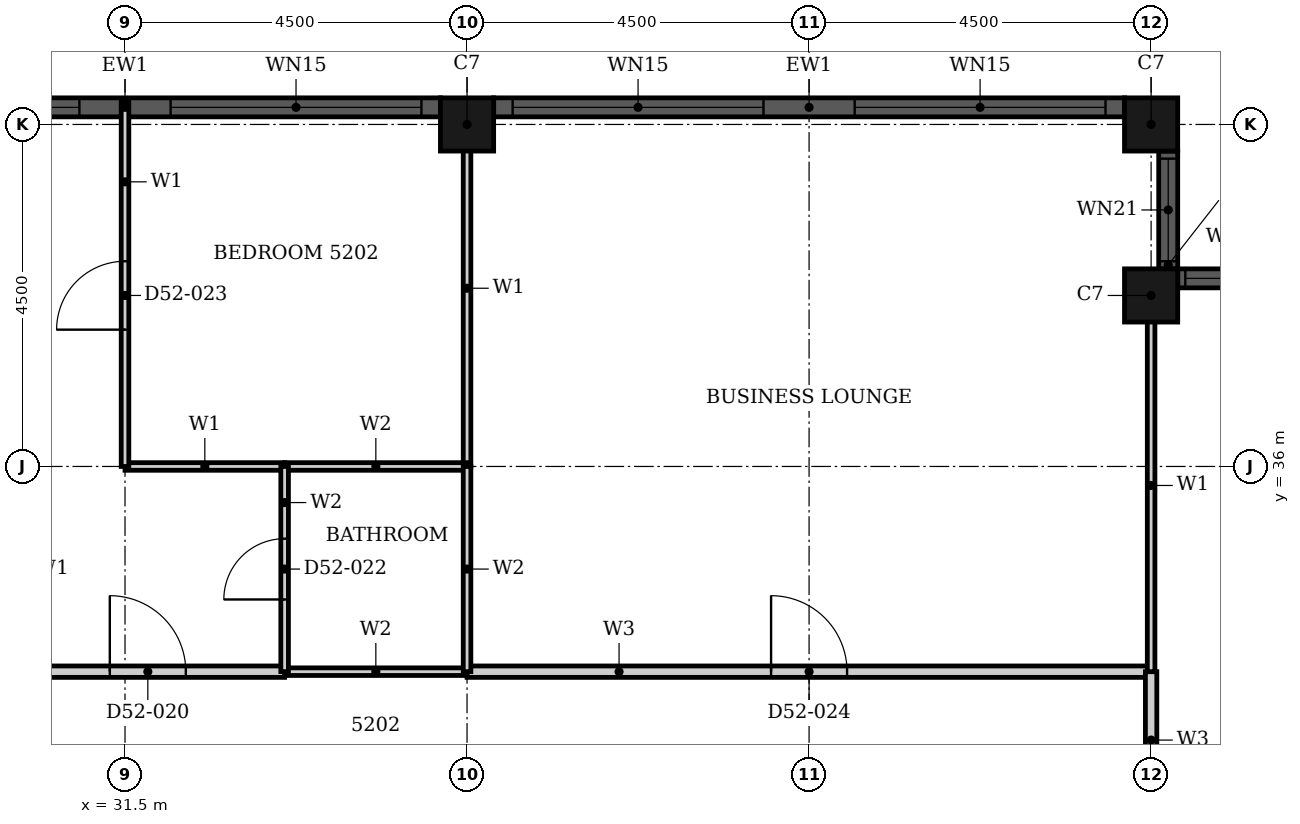
"""IFC4 building model, lengths in metres.
Left out: names, types, materials, properties, quantities, classifications, styles, units other than length and angle.
Written with IfcOpenShell. Run it as: python <this file> out.ifc"""

import sys

from ifc_helpers import new_model, si_unit, direction, frame, frame_2d, origin, origin_2d, place, context, subcontext, project, spatial, rectangle, hollow_rectangle, extrude, element, fill, save


model = new_model("IFC4")
c1 = context("Model", 3, precision=1e-05, world=origin(), true_north=direction((0.0, 1.0)))
c2 = subcontext(c1, "Body", "Model", "MODEL_VIEW")
j1 = project(units=[si_unit("LENGTHUNIT", "METRE"), si_unit("PLANEANGLEUNIT", "RADIAN")], contexts=[c1])
p1 = place(None, origin())
s1 = spatial("IfcSite", under=j1, at=p1, CompositionType="ELEMENT")
p2 = place(p1, origin())
s2 = spatial("IfcBuilding", under=s1, at=p2, CompositionType="ELEMENT")
p3 = place(p2, frame((0.0, 0.0, 207.2)))
s3 = spatial("IfcBuildingStorey", under=s2, at=p3, CompositionType="ELEMENT", Elevation=207.2)
for number, where, z_axis, x_axis in (
    (1, (45.0, 38.25, 0.0), (0.0, 0.0, 1.0), (1.0, 0.0, 0.0)),
    (2, (45.0, 40.5, 0.0), (0.0, 0.0, 1.0), (1.0, 0.0, 0.0)),
    (3, (36.0, 40.5, 0.0), (0.0, 0.0, 1.0), (1.0, 0.0, 0.0)),
):
    element("IfcColumn", number, at=place(p3, frame(where, z_axis=z_axis, x_axis=x_axis)), inside=s3, PredefinedType="COLUMN", context=c2, shape_type="SweptSolid", body=[
        extrude(hollow_rectangle(XDim=0.7, YDim=0.7, WallThickness=0.022, at=origin_2d()), origin(), (0.0, 0.0, 1.0), 3.7),
    ])
p4 = place(p3, frame((46.9, 38.475, 0.0), z_axis=(0.0, 0.0, 1.0), x_axis=(-1.0, 0.0, 0.0)))
e4 = element("IfcWall", 4, at=p4, inside=s3, PredefinedType="SOLIDWALL", context=c2, shape_type="SweptSolid", body=[
    extrude(rectangle(XDim=1.55, YDim=0.25, at=frame_2d((0.775, 0.0))), origin(), (0.0, 0.0, 1.0), 3.7),
])
p5 = place(p4, frame((0.1, 0.0, 0.9)))
e5 = element("IfcOpeningElement", 5, at=p5, cuts=e4, PredefinedType="OPENING", context=c2, shape_type="SweptSolid", body=[
    extrude(rectangle(XDim=1.35, YDim=1.85, at=frame_2d((0.675, 0.925))), frame((0.0, 0.135, 0.0), z_axis=(0.0, -1.0, 0.0), x_axis=(1.0, 0.0, 0.0)), (0.0, 0.0, 1.0), 0.27),
])
p6 = place(p3, frame((45.225, 38.6, 0.0), z_axis=(0.0, 0.0, 1.0), x_axis=(0.0, 1.0, 0.0)))
e6 = element("IfcWall", 6, at=p6, inside=s3, PredefinedType="SOLIDWALL", context=c2, shape_type="SweptSolid", body=[
    extrude(rectangle(XDim=1.55, YDim=0.25, at=frame_2d((0.775, 0.0))), origin(), (0.0, 0.0, 1.0), 3.7),
])
p7 = place(p6, frame((0.1, 0.0, 0.9)))
e7 = element("IfcOpeningElement", 7, at=p7, cuts=e6, PredefinedType="OPENING", context=c2, shape_type="SweptSolid", body=[
    extrude(rectangle(XDim=1.35, YDim=1.85, at=frame_2d((0.675, 0.925))), frame((0.0, 0.135, 0.0), z_axis=(0.0, -1.0, 0.0), x_axis=(1.0, 0.0, 0.0)), (0.0, 0.0, 1.0), 0.27),
])
p8 = place(p3, frame((44.65, 40.725, 0.0), z_axis=(0.0, 0.0, 1.0), x_axis=(-1.0, 0.0, 0.0)))
e8 = element("IfcWall", 8, at=p8, inside=s3, PredefinedType="SOLIDWALL", context=c2, shape_type="SweptSolid", body=[
    extrude(rectangle(XDim=8.3, YDim=0.25, at=frame_2d((4.15, 0.0))), origin(), (0.0, 0.0, 1.0), 3.7),
])
p9 = place(p8, frame((0.25, 0.0, 0.45)))
e9 = element("IfcOpeningElement", 9, at=p9, cuts=e8, PredefinedType="OPENING", context=c2, shape_type="SweptSolid", body=[
    extrude(rectangle(XDim=3.3, YDim=2.3, at=frame_2d((1.65, 1.15))), frame((0.0, 0.135, 0.0), z_axis=(0.0, -1.0, 0.0), x_axis=(1.0, 0.0, 0.0)), (0.0, 0.0, 1.0), 0.27),
])
p10 = place(p8, frame((4.75, 0.0, 0.45)))
e10 = element("IfcOpeningElement", 10, at=p10, cuts=e8, PredefinedType="OPENING", context=c2, shape_type="SweptSolid", body=[
    extrude(rectangle(XDim=3.3, YDim=2.3, at=frame_2d((1.65, 1.15))), frame((0.0, 0.135, 0.0), z_axis=(0.0, -1.0, 0.0), x_axis=(1.0, 0.0, 0.0)), (0.0, 0.0, 1.0), 0.27),
])
p11 = place(p3, frame((35.65, 40.725, 0.0), z_axis=(0.0, 0.0, 1.0), x_axis=(-1.0, 0.0, 0.0)))
e11 = element("IfcWall", 11, at=p11, inside=s3, PredefinedType="SOLIDWALL", context=c2, shape_type="SweptSolid", body=[
    extrude(rectangle(XDim=8.3, YDim=0.25, at=frame_2d((4.15, 0.0))), origin(), (0.0, 0.0, 1.0), 3.7),
])
p12 = place(p11, frame((0.25, 0.0, 0.45)))
e12 = element("IfcOpeningElement", 12, at=p12, cuts=e11, PredefinedType="OPENING", context=c2, shape_type="SweptSolid", body=[
    extrude(rectangle(XDim=3.3, YDim=2.3, at=frame_2d((1.65, 1.15))), frame((0.0, 0.135, 0.0), z_axis=(0.0, -1.0, 0.0), x_axis=(1.0, 0.0, 0.0)), (0.0, 0.0, 1.0), 0.27),
])
p13 = place(p11, frame((4.75, 0.0, 0.45)))
e13 = element("IfcOpeningElement", 13, at=p13, cuts=e11, PredefinedType="OPENING", context=c2, shape_type="SweptSolid", body=[
    extrude(rectangle(XDim=3.3, YDim=2.3, at=frame_2d((1.65, 1.15))), frame((0.0, 0.135, 0.0), z_axis=(0.0, -1.0, 0.0), x_axis=(1.0, 0.0, 0.0)), (0.0, 0.0, 1.0), 0.27),
])
p14 = place(p3, frame((27.0, 33.3, 0.0), z_axis=(0.0, 0.0, 1.0), x_axis=(1.0, 0.0, 0.0)))
e14 = element("IfcWall", 14, at=p14, inside=s3, PredefinedType="PARTITIONING", context=c2, shape_type="SweptSolid", body=[
    extrude(rectangle(XDim=6.6, YDim=0.15, at=frame_2d((3.3, 0.0))), origin(), (0.0, 0.0, 1.0), 3.4),
])
p15 = place(p14, frame((4.3, 0.0, 0.0)))
e15 = element("IfcOpeningElement", 15, at=p15, cuts=e14, PredefinedType="OPENING", context=c2, shape_type="SweptSolid", body=[
    extrude(rectangle(XDim=1.0, YDim=2.2, at=frame_2d((0.5, 1.1))), frame((0.0, 0.085, 0.0), z_axis=(0.0, -1.0, 0.0), x_axis=(1.0, 0.0, 0.0)), (0.0, 0.0, 1.0), 0.17),
])
p16 = place(p3, frame((36.0, 33.3, 0.0), z_axis=(0.0, 0.0, 1.0), x_axis=(1.0, 0.0, 0.0)))
e16 = element("IfcWall", 16, at=p16, inside=s3, PredefinedType="PARTITIONING", context=c2, shape_type="SweptSolid", body=[
    extrude(rectangle(XDim=9.0, YDim=0.15, at=frame_2d((4.5, 0.0))), origin(), (0.0, 0.0, 1.0), 3.4),
])
p17 = place(p16, frame((4.0, 0.0, 0.0)))
e17 = element("IfcOpeningElement", 17, at=p17, cuts=e16, PredefinedType="OPENING", context=c2, shape_type="SweptSolid", body=[
    extrude(rectangle(XDim=1.0, YDim=2.1, at=frame_2d((0.5, 1.05))), frame((0.0, 0.085, 0.0), z_axis=(0.0, -1.0, 0.0), x_axis=(1.0, 0.0, 0.0)), (0.0, 0.0, 1.0), 0.17),
])
p18 = place(p3, frame((45.0, 31.5, 0.0), z_axis=(0.0, 0.0, 1.0), x_axis=(0.0, 1.0, 0.0)))
e18 = element("IfcWall", 18, at=p18, inside=s3, PredefinedType="PARTITIONING", context=c2, shape_type="SweptSolid", body=[
    extrude(rectangle(XDim=1.8, YDim=0.15, at=frame_2d((0.9, 0.0))), origin(), (0.0, 0.0, 1.0), 3.4),
])
p19 = place(p3, frame((31.5, 36.0, 0.0), z_axis=(0.0, 0.0, 1.0), x_axis=(1.0, 0.0, 0.0)))
e19 = element("IfcWall", 19, at=p19, inside=s3, PredefinedType="PARTITIONING", context=c2, shape_type="SweptSolid", body=[
    extrude(rectangle(XDim=2.1, YDim=0.1, at=frame_2d((1.05, 0.0))), origin(), (0.0, 0.0, 1.0), 3.4),
])
p20 = place(p3, frame((31.5, 36.0, 0.0), z_axis=(0.0, 0.0, 1.0), x_axis=(0.0, 1.0, 0.0)))
e20 = element("IfcWall", 20, at=p20, inside=s3, PredefinedType="PARTITIONING", context=c2, shape_type="SweptSolid", body=[
    extrude(rectangle(XDim=4.79, YDim=0.1, at=frame_2d((2.395, 0.0))), origin(), (0.0, 0.0, 1.0), 3.4),
])
p21 = place(p20, frame((1.8, 0.0, 0.0)))
e21 = element("IfcOpeningElement", 21, at=p21, cuts=e20, PredefinedType="OPENING", context=c2, shape_type="SweptSolid", body=[
    extrude(rectangle(XDim=0.9, YDim=2.1, at=frame_2d((0.45, 1.05))), frame((0.0, 0.06, 0.0), z_axis=(0.0, -1.0, 0.0), x_axis=(1.0, 0.0, 0.0)), (0.0, 0.0, 1.0), 0.12),
])
p22 = place(p3, frame((36.0, 36.0, 0.0), z_axis=(0.0, 0.0, 1.0), x_axis=(0.0, 1.0, 0.0)))
e22 = element("IfcWall", 22, at=p22, inside=s3, PredefinedType="PARTITIONING", context=c2, shape_type="SweptSolid", body=[
    extrude(rectangle(XDim=4.69, YDim=0.1, at=frame_2d((2.345, 0.0))), origin(), (0.0, 0.0, 1.0), 3.4),
])
p23 = place(p3, frame((45.0, 33.3, 0.0), z_axis=(0.0, 0.0, 1.0), x_axis=(0.0, 1.0, 0.0)))
e23 = element("IfcWall", 23, at=p23, inside=s3, PredefinedType="PARTITIONING", context=c2, shape_type="SweptSolid", body=[
    extrude(rectangle(XDim=4.9, YDim=0.1, at=frame_2d((2.45, 0.0))), origin(), (0.0, 0.0, 1.0), 3.4),
])
for number, where, z_axis, x_axis in (
    (24, (33.6, 33.3, 0.0), (0.0, 0.0, 1.0), (1.0, 0.0, 0.0)),
    (25, (33.6, 36.0, 0.0), (0.0, 0.0, 1.0), (1.0, 0.0, 0.0)),
):
    element("IfcWall", number, at=place(p3, frame(where, z_axis=z_axis, x_axis=x_axis)), inside=s3, PredefinedType="PARTITIONING", context=c2, shape_type="SweptSolid", body=[
        extrude(rectangle(XDim=2.4, YDim=0.1, at=frame_2d((1.2, 0.0))), origin(), (0.0, 0.0, 1.0), 3.4),
    ])
p24 = place(p3, frame((33.6, 33.3, 0.0), z_axis=(0.0, 0.0, 1.0), x_axis=(0.0, 1.0, 0.0)))
e26 = element("IfcWall", 26, at=p24, inside=s3, PredefinedType="PARTITIONING", context=c2, shape_type="SweptSolid", body=[
    extrude(rectangle(XDim=2.7, YDim=0.1, at=frame_2d((1.35, 0.0))), origin(), (0.0, 0.0, 1.0), 3.4),
])
p25 = place(p24, frame((0.95, 0.0, 0.0)))
e27 = element("IfcOpeningElement", 27, at=p25, cuts=e26, PredefinedType="OPENING", context=c2, shape_type="SweptSolid", body=[
    extrude(rectangle(XDim=0.8, YDim=2.1, at=frame_2d((0.4, 1.05))), frame((0.0, 0.06, 0.0), z_axis=(0.0, -1.0, 0.0), x_axis=(1.0, 0.0, 0.0)), (0.0, 0.0, 1.0), 0.12),
])
p26 = place(p3, frame((36.0, 33.3, 0.0), z_axis=(0.0, 0.0, 1.0), x_axis=(0.0, 1.0, 0.0)))
e28 = element("IfcWall", 28, at=p26, inside=s3, PredefinedType="PARTITIONING", context=c2, shape_type="SweptSolid", body=[
    extrude(rectangle(XDim=2.7, YDim=0.1, at=frame_2d((1.35, 0.0))), origin(), (0.0, 0.0, 1.0), 3.4),
])
p27 = place(p5, origin())
e29 = element("IfcWindow", 29, at=p27, inside=s3, PartitioningType="SINGLE_PANEL", PredefinedType="WINDOW", context=c2, shape_type="SweptSolid", body=[
    extrude(rectangle(XDim=1.35, YDim=1.85, at=frame_2d((0.675, 0.925))), frame((0.0, 0.03, 0.0), z_axis=(0.0, -1.0, 0.0), x_axis=(1.0, 0.0, 0.0)), (0.0, 0.0, 1.0), 0.06),
])
fill(e5, e29)
p28 = place(p7, origin())
e30 = element("IfcWindow", 30, at=p28, inside=s3, PartitioningType="SINGLE_PANEL", PredefinedType="WINDOW", context=c2, shape_type="SweptSolid", body=[
    extrude(rectangle(XDim=1.35, YDim=1.85, at=frame_2d((0.675, 0.925))), frame((0.0, 0.03, 0.0), z_axis=(0.0, -1.0, 0.0), x_axis=(1.0, 0.0, 0.0)), (0.0, 0.0, 1.0), 0.06),
])
fill(e7, e30)
p29 = place(p9, origin())
e31 = element("IfcWindow", 31, at=p29, inside=s3, PartitioningType="SINGLE_PANEL", PredefinedType="WINDOW", context=c2, shape_type="SweptSolid", body=[
    extrude(rectangle(XDim=3.3, YDim=2.3, at=frame_2d((1.65, 1.15))), frame((0.0, 0.03, 0.0), z_axis=(0.0, -1.0, 0.0), x_axis=(1.0, 0.0, 0.0)), (0.0, 0.0, 1.0), 0.06),
])
fill(e9, e31)
p30 = place(p10, origin())
e32 = element("IfcWindow", 32, at=p30, inside=s3, PartitioningType="SINGLE_PANEL", PredefinedType="WINDOW", context=c2, shape_type="SweptSolid", body=[
    extrude(rectangle(XDim=3.3, YDim=2.3, at=frame_2d((1.65, 1.15))), frame((0.0, 0.03, 0.0), z_axis=(0.0, -1.0, 0.0), x_axis=(1.0, 0.0, 0.0)), (0.0, 0.0, 1.0), 0.06),
])
fill(e10, e32)
p31 = place(p12, origin())
e33 = element("IfcWindow", 33, at=p31, inside=s3, PartitioningType="SINGLE_PANEL", PredefinedType="WINDOW", context=c2, shape_type="SweptSolid", body=[
    extrude(rectangle(XDim=3.3, YDim=2.3, at=frame_2d((1.65, 1.15))), frame((0.0, 0.03, 0.0), z_axis=(0.0, -1.0, 0.0), x_axis=(1.0, 0.0, 0.0)), (0.0, 0.0, 1.0), 0.06),
])
fill(e12, e33)
p32 = place(p13, origin())
e34 = element("IfcWindow", 34, at=p32, inside=s3, PartitioningType="SINGLE_PANEL", PredefinedType="WINDOW", context=c2, shape_type="SweptSolid", body=[
    extrude(rectangle(XDim=3.3, YDim=2.3, at=frame_2d((1.65, 1.15))), frame((0.0, 0.03, 0.0), z_axis=(0.0, -1.0, 0.0), x_axis=(1.0, 0.0, 0.0)), (0.0, 0.0, 1.0), 0.06),
])
fill(e13, e34)
p33 = place(p15, origin())
e35 = element("IfcDoor", 35, at=p33, inside=s3, OperationType="SINGLE_SWING_RIGHT", PredefinedType="DOOR", context=c2, shape_type="SweptSolid", body=[
    extrude(rectangle(XDim=1.0, YDim=2.2, at=frame_2d((0.5, 1.1))), frame((0.0, 0.025, 0.0), z_axis=(0.0, -1.0, 0.0), x_axis=(1.0, 0.0, 0.0)), (0.0, 0.0, 1.0), 0.05),
])
fill(e15, e35)
p34 = place(p25, origin())
e36 = element("IfcDoor", 36, at=p34, inside=s3, OperationType="SINGLE_SWING_LEFT", PredefinedType="DOOR", context=c2, shape_type="SweptSolid", body=[
    extrude(rectangle(XDim=0.8, YDim=2.1, at=frame_2d((0.4, 1.05))), frame((0.0, 0.025, 0.0), z_axis=(0.0, -1.0, 0.0), x_axis=(1.0, 0.0, 0.0)), (0.0, 0.0, 1.0), 0.05),
])
fill(e27, e36)
p35 = place(p21, origin())
e37 = element("IfcDoor", 37, at=p35, inside=s3, OperationType="SINGLE_SWING_RIGHT", PredefinedType="DOOR", context=c2, shape_type="SweptSolid", body=[
    extrude(rectangle(XDim=0.9, YDim=2.1, at=frame_2d((0.45, 1.05))), frame((0.0, 0.025, 0.0), z_axis=(0.0, -1.0, 0.0), x_axis=(1.0, 0.0, 0.0)), (0.0, 0.0, 1.0), 0.05),
])
fill(e21, e37)
p36 = place(p17, origin())
e38 = element("IfcDoor", 38, at=p36, inside=s3, OperationType="SINGLE_SWING_RIGHT", PredefinedType="DOOR", context=c2, shape_type="SweptSolid", body=[
    extrude(rectangle(XDim=1.0, YDim=2.1, at=frame_2d((0.5, 1.05))), frame((0.0, 0.025, 0.0), z_axis=(0.0, -1.0, 0.0), x_axis=(1.0, 0.0, 0.0)), (0.0, 0.0, 1.0), 0.05),
])
fill(e17, e38)
save(model, sys.argv[1])
